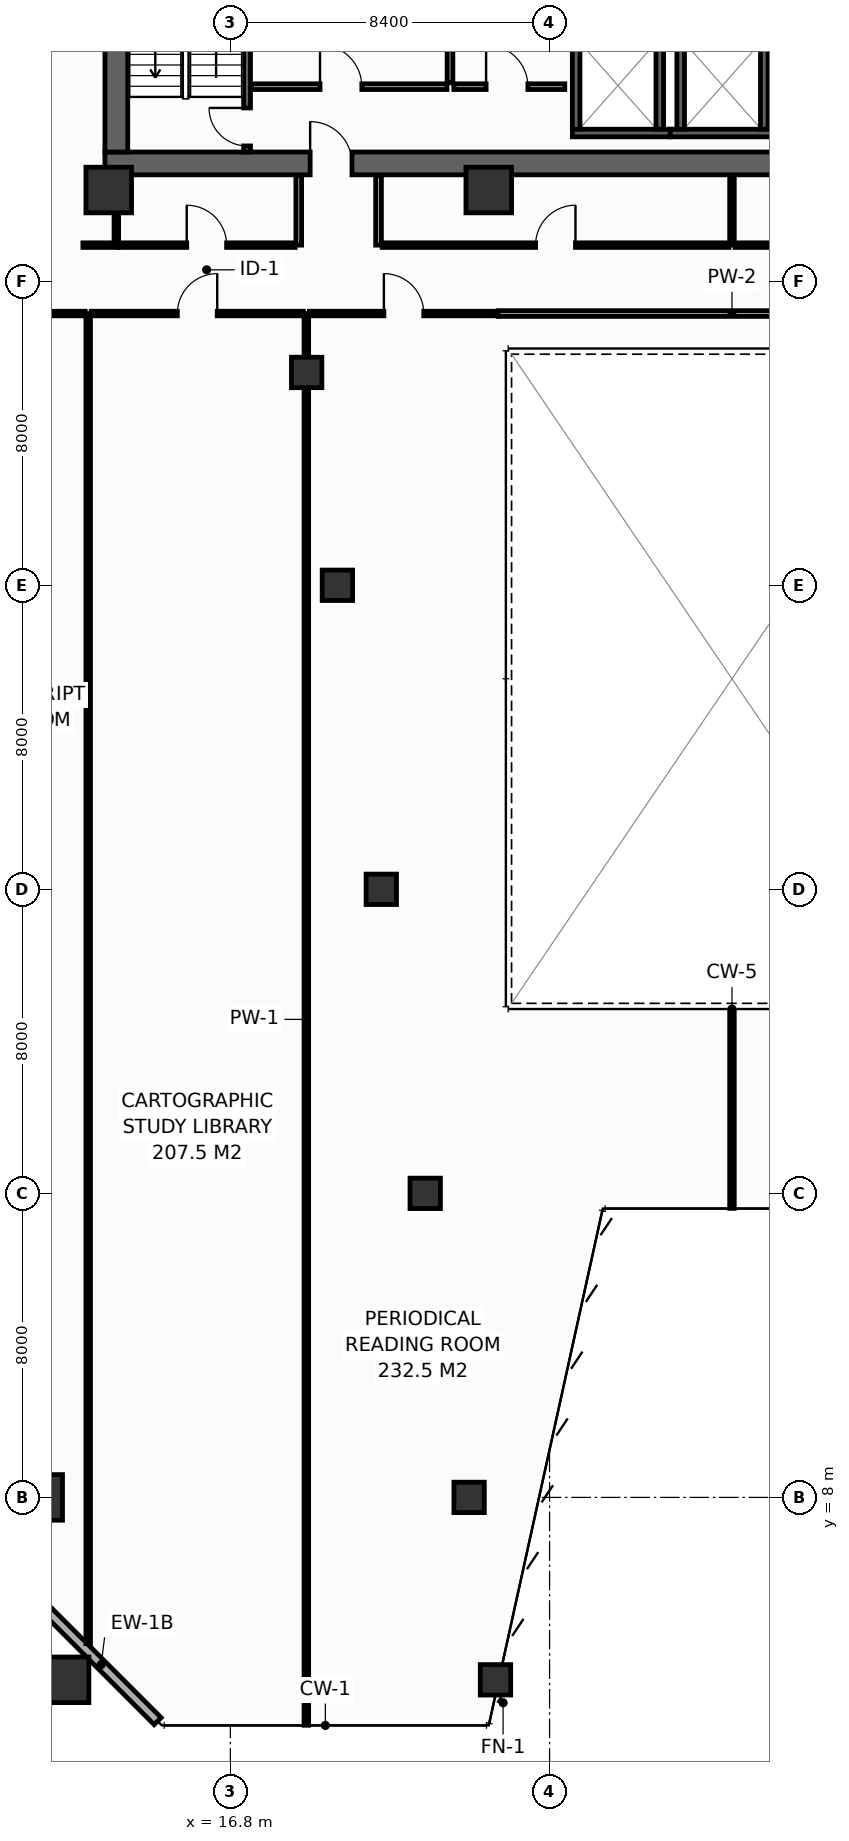
"""IFC4 building model, lengths in metres.
Left out: names, types, materials, properties, quantities, classifications, styles, units other than length and angle.
Written with IfcOpenShell. Run it as: python <this file> out.ifc"""

import sys

from ifc_helpers import new_model, si_unit, direction, frame, frame_2d, origin, origin_2d, place, context, subcontext, project, spatial, rectangle, hollow_rectangle, extrude, element, fill, save


model = new_model("IFC4")
c1 = context("Model", 3, precision=1e-05, world=origin(), true_north=direction((0.0, 1.0)))
c2 = subcontext(c1, "Body", "Model", "MODEL_VIEW")
j1 = project(units=[si_unit("LENGTHUNIT", "METRE"), si_unit("PLANEANGLEUNIT", "RADIAN")], contexts=[c1])
p1 = place(None, origin())
s1 = spatial("IfcSite", under=j1, at=p1, CompositionType="ELEMENT")
p2 = place(p1, origin())
s2 = spatial("IfcBuilding", under=s1, at=p2, CompositionType="ELEMENT")
p3 = place(p2, frame((0.0, 0.0, 42.8)))
s3 = spatial("IfcBuildingStorey", under=s2, at=p3, CompositionType="ELEMENT", Elevation=42.8)
p4 = place(p3, frame((13.5, 43.1, 0.0), z_axis=(0.0, 0.0, 1.0), x_axis=(1.0, 0.0, 0.0)))
e1 = element("IfcWall", 1, at=p4, inside=s3, PredefinedType="SHEAR", context=c2, shape_type="SweptSolid", body=[
    extrude(rectangle(XDim=32.9, YDim=0.6, at=frame_2d((16.45, 0.0))), origin(), (0.0, 0.0, 1.0), 4.15),
])
p5 = place(p4, frame((5.4, 0.0, 0.0)))
e2 = element("IfcOpeningElement", 2, at=p5, cuts=e1, PredefinedType="OPENING", context=c2, shape_type="SweptSolid", body=[
    extrude(rectangle(XDim=1.1, YDim=2.15, at=frame_2d((0.55, 1.075))), frame((0.0, 0.31, 0.0), z_axis=(0.0, -1.0, 0.0), x_axis=(1.0, 0.0, 0.0)), (0.0, 0.0, 1.0), 0.62),
])
p6 = place(p4, frame((25.6, 0.0, 0.0)))
e3 = element("IfcOpeningElement", 3, at=p6, cuts=e1, PredefinedType="OPENING", context=c2, shape_type="SweptSolid", body=[
    extrude(rectangle(XDim=1.1, YDim=2.15, at=frame_2d((0.55, 1.075))), frame((0.0, 0.31, 0.0), z_axis=(0.0, -1.0, 0.0), x_axis=(1.0, 0.0, 0.0)), (0.0, 0.0, 1.0), 0.62),
])
p7 = place(p3, frame((13.8, 43.4, 0.0), z_axis=(0.0, 0.0, 1.0), x_axis=(0.0, 1.0, 0.0)))
e4 = element("IfcWall", 4, at=p7, inside=s3, PredefinedType="SHEAR", context=c2, shape_type="SweptSolid", body=[
    extrude(rectangle(XDim=10.4, YDim=0.6, at=frame_2d((5.2, 0.0))), origin(), (0.0, 0.0, 1.0), 4.15),
])
for number, where, z_axis, x_axis in (
    (5, (13.6, 42.4, 0.0), (0.0, 0.0, 1.0), (1.0, 0.0, 0.0)),
    (6, (23.6, 42.4, 0.0), (0.0, 0.0, 1.0), (1.0, 0.0, 0.0)),
    (7, (12.477, 3.2, 0.0), (0.0, 0.0, 1.0), (1.0, 0.0, 0.0)),
):
    element("IfcColumn", number, at=place(p3, frame(where, z_axis=z_axis, x_axis=x_axis)), inside=s3, PredefinedType="COLUMN", context=c2, shape_type="SweptSolid", body=[
        extrude(hollow_rectangle(XDim=1.2, YDim=1.2, WallThickness=0.055, at=origin_2d()), origin(), (0.0, 0.0, 1.0), 4.4),
    ])
p8 = place(p3, frame((23.777, 3.2, 0.0), z_axis=(0.0, 0.0, 1.0), x_axis=(1.0, 0.0, 0.0)))
e8 = element("IfcColumn", 8, at=p8, inside=s3, PredefinedType="COLUMN", context=c2, shape_type="SweptSolid", body=[
    extrude(hollow_rectangle(XDim=0.8, YDim=0.8, WallThickness=0.036, at=origin_2d()), origin(), (0.0, 0.0, 1.0), 4.4),
])
p9 = place(p3, frame((11.783, 8.0, 0.0), z_axis=(0.0, 0.0, 1.0), x_axis=(1.0, 0.0, 0.0)))
e9 = element("IfcColumn", 9, at=p9, inside=s3, PredefinedType="COLUMN", context=c2, shape_type="SweptSolid", body=[
    extrude(hollow_rectangle(XDim=1.2, YDim=1.2, WallThickness=0.055, at=origin_2d()), origin(), (0.0, 0.0, 1.0), 4.4),
])
for number, where, z_axis, x_axis in (
    (10, (23.083, 8.0, 0.0), (0.0, 0.0, 1.0), (1.0, 0.0, 0.0)),
    (11, (21.928, 16.0, 0.0), (0.0, 0.0, 1.0), (1.0, 0.0, 0.0)),
    (12, (20.772, 24.0, 0.0), (0.0, 0.0, 1.0), (1.0, 0.0, 0.0)),
    (13, (19.617, 32.0, 0.0), (0.0, 0.0, 1.0), (1.0, 0.0, 0.0)),
    (14, (18.808, 37.6, 0.0), (0.0, 0.0, 1.0), (1.0, 0.0, 0.0)),
):
    element("IfcColumn", number, at=place(p3, frame(where, z_axis=z_axis, x_axis=x_axis)), inside=s3, PredefinedType="COLUMN", context=c2, shape_type="SweptSolid", body=[
        extrude(hollow_rectangle(XDim=0.8, YDim=0.8, WallThickness=0.036, at=origin_2d()), origin(), (0.0, 0.0, 1.0), 4.4),
    ])
p10 = place(p3, frame((25.8, 43.9, 0.0), z_axis=(0.0, 0.0, 1.0), x_axis=(1.0, 0.0, 0.0)))
e15 = element("IfcWall", 15, at=p10, inside=s3, PredefinedType="SHEAR", context=c2, shape_type="SweptSolid", body=[
    extrude(rectangle(XDim=2.575, YDim=0.2, at=frame_2d((1.288, 0.0))), origin(), (0.0, 0.0, 1.0), 4.15),
])
for number, where, z_axis, x_axis in (
    (16, (25.9, 44.0, 0.0), (0.0, 0.0, 1.0), (0.0, 1.0, 0.0)),
    (17, (28.1, 44.0, 0.0), (0.0, 0.0, 1.0), (0.0, 1.0, 0.0)),
):
    element("IfcWall", number, at=place(p3, frame(where, z_axis=z_axis, x_axis=x_axis)), inside=s3, PredefinedType="SHEAR", context=c2, shape_type="SweptSolid", body=[
        extrude(rectangle(XDim=2.3, YDim=0.2, at=frame_2d((1.15, 0.0))), origin(), (0.0, 0.0, 1.0), 4.15),
    ])
p11 = place(p3, frame((28.375, 43.9, 0.0), z_axis=(0.0, 0.0, 1.0), x_axis=(1.0, 0.0, 0.0)))
e18 = element("IfcWall", 18, at=p11, inside=s3, PredefinedType="SHEAR", context=c2, shape_type="SweptSolid", body=[
    extrude(rectangle(XDim=2.75, YDim=0.2, at=frame_2d((1.375, 0.0))), origin(), (0.0, 0.0, 1.0), 4.15),
])
for number, where, z_axis, x_axis in (
    (19, (28.65, 44.0, 0.0), (0.0, 0.0, 1.0), (0.0, 1.0, 0.0)),
    (20, (30.85, 44.0, 0.0), (0.0, 0.0, 1.0), (0.0, 1.0, 0.0)),
):
    element("IfcWall", number, at=place(p3, frame(where, z_axis=z_axis, x_axis=x_axis)), inside=s3, PredefinedType="SHEAR", context=c2, shape_type="SweptSolid", body=[
        extrude(rectangle(XDim=2.3, YDim=0.2, at=frame_2d((1.15, 0.0))), origin(), (0.0, 0.0, 1.0), 4.15),
    ])
p12 = place(p3, frame((17.24, 43.4, 0.0), z_axis=(0.0, 0.0, 1.0), x_axis=(0.0, 1.0, 0.0)))
e21 = element("IfcWall", 21, at=p12, inside=s3, PredefinedType="SHEAR", context=c2, shape_type="SweptSolid", body=[
    extrude(rectangle(XDim=10.4, YDim=0.18, at=frame_2d((5.2, 0.0))), origin(), (0.0, 0.0, 1.0), 4.15),
])
p13 = place(p12, frame((0.16, 0.0, 0.0)))
e22 = element("IfcOpeningElement", 22, at=p13, cuts=e21, PredefinedType="OPENING", context=c2, shape_type="SweptSolid", body=[
    extrude(rectangle(XDim=1.0, YDim=2.15, at=frame_2d((0.5, 1.075))), frame((0.0, 0.1, 0.0), z_axis=(0.0, -1.0, 0.0), x_axis=(1.0, 0.0, 0.0)), (0.0, 0.0, 1.0), 0.2),
])
p14 = place(p3, frame((17.36, 45.12, 0.0), z_axis=(0.0, 0.0, 1.0), x_axis=(1.0, 0.0, 0.0)))
e23 = element("IfcWall", 23, at=p14, inside=s3, PredefinedType="PARTITIONING", context=c2, shape_type="SweptSolid", body=[
    extrude(rectangle(XDim=5.14, YDim=0.15, at=frame_2d((2.57, 0.0))), origin(), (0.0, 0.0, 1.0), 4.15),
])
p15 = place(p14, frame((1.8, 0.0, 0.0)))
e24 = element("IfcOpeningElement", 24, at=p15, cuts=e23, PredefinedType="OPENING", context=c2, shape_type="SweptSolid", body=[
    extrude(rectangle(XDim=1.1, YDim=2.15, at=frame_2d((0.55, 1.075))), frame((0.0, 0.085, 0.0), z_axis=(0.0, -1.0, 0.0), x_axis=(1.0, 0.0, 0.0)), (0.0, 0.0, 1.0), 0.17),
])
p16 = place(p3, frame((22.58, 50.55, 0.0), z_axis=(0.0, 0.0, 1.0), x_axis=(0.0, -1.0, 0.0)))
e25 = element("IfcWall", 25, at=p16, inside=s3, PredefinedType="PARTITIONING", context=c2, shape_type="SweptSolid", body=[
    extrude(rectangle(XDim=5.33, YDim=0.15, at=frame_2d((2.665, 0.0))), origin(), (0.0, 0.0, 1.0), 4.15),
])
p17 = place(p16, frame((1.8, 0.0, 0.0)))
e26 = element("IfcOpeningElement", 26, at=p17, cuts=e25, PredefinedType="OPENING", context=c2, shape_type="SweptSolid", body=[
    extrude(rectangle(XDim=1.1, YDim=2.15, at=frame_2d((0.55, 1.075))), frame((0.0, 0.085, 0.0), z_axis=(0.0, -1.0, 0.0), x_axis=(1.0, 0.0, 0.0)), (0.0, 0.0, 1.0), 0.17),
])
p18 = place(p3, frame((22.68, 45.12, 0.0), z_axis=(0.0, 0.0, 1.0), x_axis=(1.0, 0.0, 0.0)))
e27 = element("IfcWall", 27, at=p18, inside=s3, PredefinedType="PARTITIONING", context=c2, shape_type="SweptSolid", body=[
    extrude(rectangle(XDim=2.92, YDim=0.15, at=frame_2d((1.46, 0.0))), origin(), (0.0, 0.0, 1.0), 4.15),
])
p19 = place(p18, frame((0.85, 0.0, 0.0)))
e28 = element("IfcOpeningElement", 28, at=p19, cuts=e27, PredefinedType="OPENING", context=c2, shape_type="SweptSolid", body=[
    extrude(rectangle(XDim=1.1, YDim=2.15, at=frame_2d((0.55, 1.075))), frame((0.0, 0.085, 0.0), z_axis=(0.0, -1.0, 0.0), x_axis=(1.0, 0.0, 0.0)), (0.0, 0.0, 1.0), 0.17),
])
p20 = place(p3, frame((11.913, 5.087, 0.0), z_axis=(0.0, 0.0, 1.0), x_axis=(0.707106781187, -0.707106781187, 0.0)))
e29 = element("IfcWall", 29, at=p20, inside=s3, PredefinedType="STANDARD", context=c2, shape_type="SweptSolid", body=[
    extrude(rectangle(XDim=4.206, YDim=0.26, at=frame_2d((2.103, 0.0))), origin(), (0.0, 0.0, 1.0), 4.15),
])
p21 = place(p3, frame((12.92, 40.95, 0.0), z_axis=(0.0, 0.0, 1.0), x_axis=(1.0, 0.0, 0.0)))
e30 = element("IfcWall", 30, at=p21, inside=s3, PredefinedType="PARTITIONING", context=c2, shape_type="SweptSolid", body=[
    extrude(rectangle(XDim=0.93, YDim=0.12, at=frame_2d((0.465, 0.0))), origin(), (0.0, 0.0, 1.0), 4.15),
])
p22 = place(p3, frame((13.8, 41.03, 0.0), z_axis=(0.0, 0.0, 1.0), x_axis=(0.0, 1.0, 0.0)))
e31 = element("IfcWall", 31, at=p22, inside=s3, PredefinedType="PARTITIONING", context=c2, shape_type="SweptSolid", body=[
    extrude(rectangle(XDim=1.75, YDim=0.12, at=frame_2d((0.875, 0.0))), origin(), (0.0, 0.0, 1.0), 4.15),
])
for number, where, z_axis, x_axis in (
    (32, (18.6, 40.95, 0.0), (0.0, 0.0, 1.0), (0.0, 1.0, 0.0)),
    (33, (20.7, 40.95, 0.0), (0.0, 0.0, 1.0), (0.0, 1.0, 0.0)),
):
    element("IfcWall", number, at=place(p3, frame(where, z_axis=z_axis, x_axis=x_axis)), inside=s3, PredefinedType="PARTITIONING", context=c2, shape_type="SweptSolid", body=[
        extrude(rectangle(XDim=1.83, YDim=0.15, at=frame_2d((0.915, 0.0))), origin(), (0.0, 0.0, 1.0), 4.15),
    ])
p23 = place(p3, frame((13.85, 40.95, 0.0), z_axis=(0.0, 0.0, 1.0), x_axis=(1.0, 0.0, 0.0)))
e34 = element("IfcWall", 34, at=p23, inside=s3, PredefinedType="PARTITIONING", context=c2, shape_type="SweptSolid", body=[
    extrude(rectangle(XDim=4.655, YDim=0.12, at=frame_2d((2.327, 0.0))), origin(), (0.0, 0.0, 1.0), 4.15),
])
p24 = place(p23, frame((1.802, 0.0, 0.0)))
e35 = element("IfcOpeningElement", 35, at=p24, cuts=e34, PredefinedType="OPENING", context=c2, shape_type="SweptSolid", body=[
    extrude(rectangle(XDim=1.05, YDim=2.15, at=frame_2d((0.525, 1.075))), frame((0.0, 0.07, 0.0), z_axis=(0.0, -1.0, 0.0), x_axis=(1.0, 0.0, 0.0)), (0.0, 0.0, 1.0), 0.14),
])
p25 = place(p3, frame((30.0, 40.95, 0.0), z_axis=(0.0, 0.0, 1.0), x_axis=(0.0, 1.0, 0.0)))
e36 = element("IfcWall", 36, at=p25, inside=s3, PredefinedType="PARTITIONING", context=c2, shape_type="SweptSolid", body=[
    extrude(rectangle(XDim=1.83, YDim=0.12, at=frame_2d((0.915, 0.0))), origin(), (0.0, 0.0, 1.0), 3.335),
])
p26 = place(p3, frame((20.795, 40.95, 0.0), z_axis=(0.0, 0.0, 1.0), x_axis=(1.0, 0.0, 0.0)))
e37 = element("IfcWall", 37, at=p26, inside=s3, PredefinedType="PARTITIONING", context=c2, shape_type="SweptSolid", body=[
    extrude(rectangle(XDim=9.125, YDim=0.12, at=frame_2d((4.562, 0.0))), origin(), (0.0, 0.0, 1.0), 3.335),
])
p27 = place(p26, frame((4.037, 0.0, 0.0)))
e38 = element("IfcOpeningElement", 38, at=p27, cuts=e37, PredefinedType="OPENING", context=c2, shape_type="SweptSolid", body=[
    extrude(rectangle(XDim=1.05, YDim=2.15, at=frame_2d((0.525, 1.075))), frame((0.0, 0.07, 0.0), z_axis=(0.0, -1.0, 0.0), x_axis=(1.0, 0.0, 0.0)), (0.0, 0.0, 1.0), 0.14),
])
p28 = place(p3, frame((30.08, 40.95, 0.0), z_axis=(0.0, 0.0, 1.0), x_axis=(1.0, 0.0, 0.0)))
e39 = element("IfcWall", 39, at=p28, inside=s3, PredefinedType="PARTITIONING", context=c2, shape_type="SweptSolid", body=[
    extrude(rectangle(XDim=8.625, YDim=0.12, at=frame_2d((4.312, 0.0))), origin(), (0.0, 0.0, 1.0), 3.335),
])
p29 = place(p28, frame((3.862, 0.0, 0.0)))
e40 = element("IfcOpeningElement", 40, at=p29, cuts=e39, PredefinedType="OPENING", context=c2, shape_type="SweptSolid", body=[
    extrude(rectangle(XDim=0.9, YDim=2.1, at=frame_2d((0.45, 1.05))), frame((0.0, 0.07, 0.0), z_axis=(0.0, -1.0, 0.0), x_axis=(1.0, 0.0, 0.0)), (0.0, 0.0, 1.0), 0.14),
])
p30 = place(p3, frame((13.06, 4.152, 0.0), z_axis=(0.0, 0.0, 1.0), x_axis=(0.0, 1.0, 0.0)))
e41 = element("IfcWall", 41, at=p30, inside=s3, PredefinedType="PARTITIONING", context=c2, shape_type="SweptSolid", body=[
    extrude(rectangle(XDim=34.998, YDim=0.12, at=frame_2d((17.499, 0.0))), origin(), (0.0, 0.0, 1.0), 3.335),
])
p31 = place(p3, frame((18.8, 2.005, 0.0), z_axis=(0.0, 0.0, 1.0), x_axis=(0.0, 1.0, 0.0)))
e42 = element("IfcWall", 42, at=p31, inside=s3, PredefinedType="PARTITIONING", context=c2, shape_type="SweptSolid", body=[
    extrude(rectangle(XDim=37.145, YDim=0.12, at=frame_2d((18.573, 0.0))), origin(), (0.0, 0.0, 1.0), 3.335),
])
p32 = place(p3, frame((30.0, 15.605, 0.0), z_axis=(0.0, 0.0, 1.0), x_axis=(0.0, 1.0, 0.0)))
e43 = element("IfcWall", 43, at=p32, inside=s3, PredefinedType="PARTITIONING", context=c2, shape_type="SweptSolid", body=[
    extrude(rectangle(XDim=5.175, YDim=0.12, at=frame_2d((2.587, 0.0))), origin(), (0.0, 0.0, 1.0), 4.15),
])
p33 = place(p3, frame((6.334, 39.15, 0.0), z_axis=(0.0, 0.0, 1.0), x_axis=(1.0, 0.0, 0.0)))
e44 = element("IfcWall", 44, at=p33, inside=s3, PredefinedType="PARTITIONING", context=c2, shape_type="SweptSolid", body=[
    extrude(rectangle(XDim=6.646, YDim=0.12, at=frame_2d((3.323, 0.0))), origin(), (0.0, 0.0, 1.0), 3.635),
])
p34 = place(p33, frame((2.798, 0.0, 0.0)))
e45 = element("IfcOpeningElement", 45, at=p34, cuts=e44, PredefinedType="OPENING", context=c2, shape_type="SweptSolid", body=[
    extrude(rectangle(XDim=1.05, YDim=2.15, at=frame_2d((0.525, 1.075))), frame((0.0, 0.07, 0.0), z_axis=(0.0, -1.0, 0.0), x_axis=(1.0, 0.0, 0.0)), (0.0, 0.0, 1.0), 0.14),
])
p35 = place(p3, frame((13.14, 39.15, 0.0), z_axis=(0.0, 0.0, 1.0), x_axis=(1.0, 0.0, 0.0)))
e46 = element("IfcWall", 46, at=p35, inside=s3, PredefinedType="PARTITIONING", context=c2, shape_type="SweptSolid", body=[
    extrude(rectangle(XDim=5.58, YDim=0.12, at=frame_2d((2.79, 0.0))), origin(), (0.0, 0.0, 1.0), 4.15),
])
p36 = place(p35, frame((2.265, 0.0, 0.0)))
e47 = element("IfcOpeningElement", 47, at=p36, cuts=e46, PredefinedType="OPENING", context=c2, shape_type="SweptSolid", body=[
    extrude(rectangle(XDim=1.05, YDim=2.15, at=frame_2d((0.525, 1.075))), frame((0.0, 0.07, 0.0), z_axis=(0.0, -1.0, 0.0), x_axis=(1.0, 0.0, 0.0)), (0.0, 0.0, 1.0), 0.14),
])
p37 = place(p3, frame((18.88, 39.15, 0.0), z_axis=(0.0, 0.0, 1.0), x_axis=(1.0, 0.0, 0.0)))
e48 = element("IfcWall", 48, at=p37, inside=s3, PredefinedType="PARTITIONING", context=c2, shape_type="SweptSolid", body=[
    extrude(rectangle(XDim=4.97, YDim=0.12, at=frame_2d((2.485, 0.0))), origin(), (0.0, 0.0, 1.0), 3.335),
])
p38 = place(p37, frame((1.96, 0.0, 0.0)))
e49 = element("IfcOpeningElement", 49, at=p38, cuts=e48, PredefinedType="OPENING", context=c2, shape_type="SweptSolid", body=[
    extrude(rectangle(XDim=1.05, YDim=2.15, at=frame_2d((0.525, 1.075))), frame((0.0, 0.07, 0.0), z_axis=(0.0, -1.0, 0.0), x_axis=(1.0, 0.0, 0.0)), (0.0, 0.0, 1.0), 0.14),
])
p39 = place(p3, frame((23.85, 39.15, 0.0), z_axis=(0.0, 0.0, 1.0), x_axis=(1.0, 0.0, 0.0)))
e50 = element("IfcWall", 50, at=p39, inside=s3, PredefinedType="PARTITIONING", context=c2, shape_type="SweptSolid", body=[
    extrude(rectangle(XDim=12.3, YDim=0.15, at=frame_2d((6.15, 0.0))), origin(), (0.0, 0.0, 1.0), 4.15),
])
p40 = place(p13, origin())
e51 = element("IfcDoor", 51, at=p40, inside=s3, OperationType="SINGLE_SWING_RIGHT", PredefinedType="DOOR", context=c2, shape_type="SweptSolid", body=[
    extrude(rectangle(XDim=1.0, YDim=2.15, at=frame_2d((0.5, 1.075))), frame((0.0, 0.025, 0.0), z_axis=(0.0, -1.0, 0.0), x_axis=(1.0, 0.0, 0.0)), (0.0, 0.0, 1.0), 0.05),
])
fill(e22, e51)
p41 = place(p15, origin())
e52 = element("IfcDoor", 52, at=p41, inside=s3, OperationType="SINGLE_SWING_LEFT", PredefinedType="DOOR", context=c2, shape_type="SweptSolid", body=[
    extrude(rectangle(XDim=1.1, YDim=2.15, at=frame_2d((0.55, 1.075))), frame((0.0, 0.025, 0.0), z_axis=(0.0, -1.0, 0.0), x_axis=(1.0, 0.0, 0.0)), (0.0, 0.0, 1.0), 0.05),
])
fill(e24, e52)
p42 = place(p19, origin())
e53 = element("IfcDoor", 53, at=p42, inside=s3, OperationType="SINGLE_SWING_LEFT", PredefinedType="DOOR", context=c2, shape_type="SweptSolid", body=[
    extrude(rectangle(XDim=1.1, YDim=2.15, at=frame_2d((0.55, 1.075))), frame((0.0, 0.025, 0.0), z_axis=(0.0, -1.0, 0.0), x_axis=(1.0, 0.0, 0.0)), (0.0, 0.0, 1.0), 0.05),
])
fill(e28, e53)
p43 = place(p5, origin())
e54 = element("IfcDoor", 54, at=p43, inside=s3, OperationType="SINGLE_SWING_LEFT", PredefinedType="DOOR", context=c2, shape_type="SweptSolid", body=[
    extrude(rectangle(XDim=1.1, YDim=2.15, at=frame_2d((0.55, 1.075))), frame((0.0, 0.025, 0.0), z_axis=(0.0, -1.0, 0.0), x_axis=(1.0, 0.0, 0.0)), (0.0, 0.0, 1.0), 0.05),
])
fill(e2, e54)
p44 = place(p24, origin())
e55 = element("IfcDoor", 55, at=p44, inside=s3, OperationType="SINGLE_SWING_LEFT", PredefinedType="DOOR", context=c2, shape_type="SweptSolid", body=[
    extrude(rectangle(XDim=1.05, YDim=2.15, at=frame_2d((0.525, 1.075))), frame((0.0, 0.025, 0.0), z_axis=(0.0, -1.0, 0.0), x_axis=(1.0, 0.0, 0.0)), (0.0, 0.0, 1.0), 0.05),
])
fill(e35, e55)
p45 = place(p27, origin())
e56 = element("IfcDoor", 56, at=p45, inside=s3, OperationType="SINGLE_SWING_RIGHT", PredefinedType="DOOR", context=c2, shape_type="SweptSolid", body=[
    extrude(rectangle(XDim=1.05, YDim=2.15, at=frame_2d((0.525, 1.075))), frame((0.0, 0.025, 0.0), z_axis=(0.0, -1.0, 0.0), x_axis=(1.0, 0.0, 0.0)), (0.0, 0.0, 1.0), 0.05),
])
fill(e38, e56)
p46 = place(p36, origin())
e57 = element("IfcDoor", 57, at=p46, inside=s3, OperationType="SINGLE_SWING_RIGHT", PredefinedType="DOOR", context=c2, shape_type="SweptSolid", body=[
    extrude(rectangle(XDim=1.05, YDim=2.15, at=frame_2d((0.525, 1.075))), frame((0.0, 0.025, 0.0), z_axis=(0.0, -1.0, 0.0), x_axis=(1.0, 0.0, 0.0)), (0.0, 0.0, 1.0), 0.05),
])
fill(e47, e57)
p47 = place(p38, origin())
e58 = element("IfcDoor", 58, at=p47, inside=s3, OperationType="SINGLE_SWING_LEFT", PredefinedType="DOOR", context=c2, shape_type="SweptSolid", body=[
    extrude(rectangle(XDim=1.05, YDim=2.15, at=frame_2d((0.525, 1.075))), frame((0.0, 0.025, 0.0), z_axis=(0.0, -1.0, 0.0), x_axis=(1.0, 0.0, 0.0)), (0.0, 0.0, 1.0), 0.05),
])
fill(e49, e58)
save(model, sys.argv[1])
